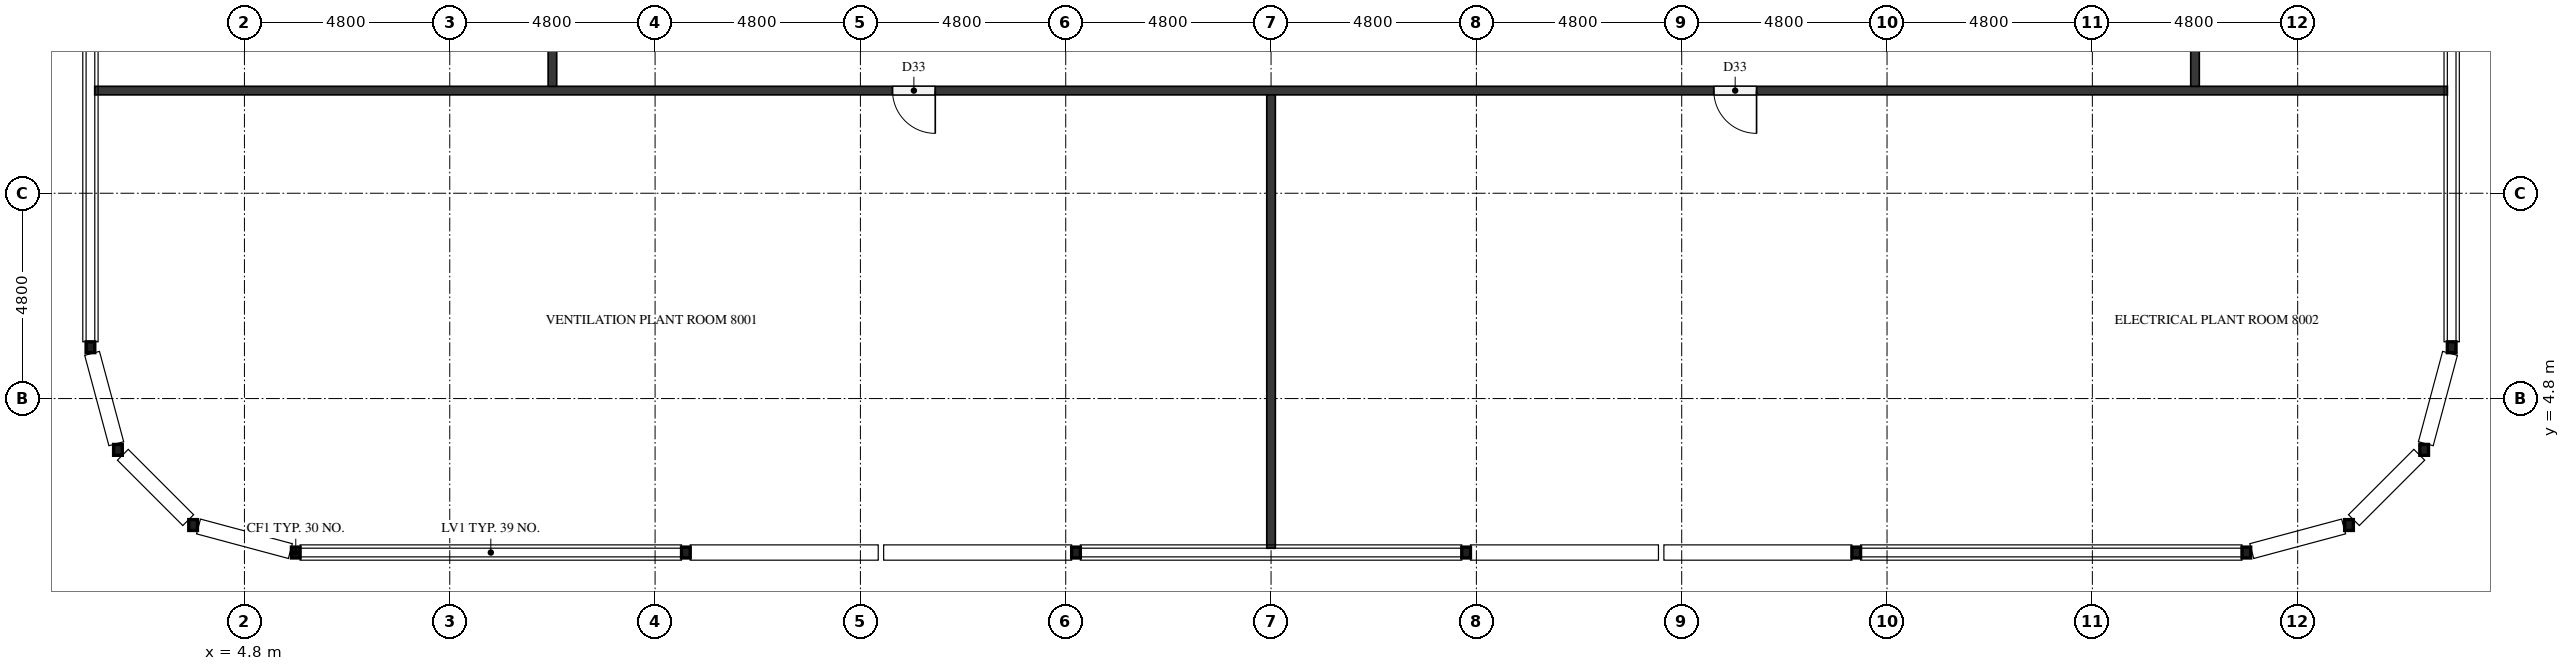
"""IFC4 building model, lengths in metres.
Left out: names, types, materials, properties, quantities, classifications, styles, units other than length and angle.
Written with IfcOpenShell. Run it as: python <this file> out.ifc"""

import sys

from ifc_helpers import new_model, si_unit, direction, frame, frame_2d, origin, origin_2d, place, context, subcontext, project, spatial, rectangle, hollow_rectangle, extrude, element, fill, save


model = new_model("IFC4")
c1 = context("Model", 3, precision=1e-05, world=origin(), true_north=direction((0.0, 1.0)))
c2 = subcontext(c1, "Body", "Model", "MODEL_VIEW")
j1 = project(units=[si_unit("LENGTHUNIT", "METRE"), si_unit("PLANEANGLEUNIT", "RADIAN")], contexts=[c1])
p1 = place(None, origin())
s1 = spatial("IfcSite", under=j1, at=p1, CompositionType="ELEMENT")
p2 = place(p1, origin())
s2 = spatial("IfcBuilding", under=s1, at=p2, CompositionType="ELEMENT")
p3 = place(p2, frame((0.0, 0.0, 310.1)))
s3 = spatial("IfcBuildingStorey", under=s2, at=p3, CompositionType="ELEMENT", Elevation=310.1)
for number, where, z_axis, x_axis in (
    (1, (6.0, 1.2, 0.0), (0.0, 0.0, 1.0), (1.0, 0.0, 0.0)),
    (2, (15.12, 1.2, 0.0), (0.0, 0.0, 1.0), (1.0, 0.0, 0.0)),
    (3, (24.24, 1.2, 0.0), (0.0, 0.0, 1.0), (1.0, 0.0, 0.0)),
    (4, (33.36, 1.2, 0.0), (0.0, 0.0, 1.0), (1.0, 0.0, 0.0)),
    (5, (42.48, 1.2, 0.0), (0.0, 0.0, 1.0), (1.0, 0.0, 0.0)),
    (6, (51.6, 1.2, 0.0), (0.0, 0.0, 1.0), (1.0, 0.0, 0.0)),
    (7, (54.0, 1.843, 0.0), (0.0, 0.0, 1.0), (1.0, 0.0, 0.0)),
    (8, (55.757, 3.6, 0.0), (0.0, 0.0, 1.0), (1.0, 0.0, 0.0)),
    (9, (56.4, 6.0, 0.0), (0.0, 0.0, 1.0), (1.0, 0.0, 0.0)),
    (10, (1.2, 6.0, 0.0), (0.0, 0.0, 1.0), (1.0, 0.0, 0.0)),
    (11, (1.843, 3.6, 0.0), (0.0, 0.0, 1.0), (1.0, 0.0, 0.0)),
    (12, (3.6, 1.843, 0.0), (0.0, 0.0, 1.0), (1.0, 0.0, 0.0)),
):
    element("IfcColumn", number, at=place(p3, frame(where, z_axis=z_axis, x_axis=x_axis)), inside=s3, PredefinedType="COLUMN", context=c2, shape_type="SweptSolid", body=[
        extrude(hollow_rectangle(XDim=0.203, YDim=0.254, WallThickness=0.01, InnerFilletRadius=0.004, OuterFilletRadius=0.013, at=origin_2d()), origin(), (0.0, 0.0, 1.0), 3.8),
    ])
p4 = place(p3, frame((56.3, 12.0, 0.0), z_axis=(0.0, 0.0, 1.0), x_axis=(-1.0, 0.0, 0.0)))
e13 = element("IfcWall", 13, at=p4, inside=s3, PredefinedType="PARTITIONING", context=c2, shape_type="SweptSolid", body=[
    extrude(rectangle(XDim=55.0, YDim=0.2, at=frame_2d((27.5, 0.0))), origin(), (0.0, 0.0, 1.0), 3.8),
])
p5 = place(p4, frame((35.35, 0.0, 0.0)))
e14 = element("IfcOpeningElement", 14, at=p5, cuts=e13, PredefinedType="OPENING", context=c2, shape_type="SweptSolid", body=[
    extrude(rectangle(XDim=1.0, YDim=2.1, at=frame_2d((0.5, 1.05))), frame((0.0, 0.11, 0.0), z_axis=(0.0, -1.0, 0.0), x_axis=(1.0, 0.0, 0.0)), (0.0, 0.0, 1.0), 0.22),
])
p6 = place(p4, frame((16.15, 0.0, 0.0)))
e15 = element("IfcOpeningElement", 15, at=p6, cuts=e13, PredefinedType="OPENING", context=c2, shape_type="SweptSolid", body=[
    extrude(rectangle(XDim=1.0, YDim=2.1, at=frame_2d((0.5, 1.05))), frame((0.0, 0.11, 0.0), z_axis=(0.0, -1.0, 0.0), x_axis=(1.0, 0.0, 0.0)), (0.0, 0.0, 1.0), 0.22),
])
p7 = place(p3, frame((12.0, 12.1, 0.0), z_axis=(0.0, 0.0, 1.0), x_axis=(0.0, 1.0, 0.0)))
e16 = element("IfcWall", 16, at=p7, inside=s3, PredefinedType="PARTITIONING", context=c2, shape_type="SweptSolid", body=[
    extrude(rectangle(XDim=28.6, YDim=0.2, at=frame_2d((14.3, 0.0))), origin(), (0.0, 0.0, 1.0), 3.8),
])
p8 = place(p7, frame((13.75, 0.0, 0.0)))
e17 = element("IfcOpeningElement", 17, at=p8, cuts=e16, PredefinedType="OPENING", context=c2, shape_type="SweptSolid", body=[
    extrude(rectangle(XDim=1.0, YDim=2.1, at=frame_2d((0.5, 1.05))), frame((0.0, 0.11, 0.0), z_axis=(0.0, -1.0, 0.0), x_axis=(1.0, 0.0, 0.0)), (0.0, 0.0, 1.0), 0.22),
])
p9 = place(p3, frame((28.8, 1.3, 0.0), z_axis=(0.0, 0.0, 1.0), x_axis=(0.0, 1.0, 0.0)))
e18 = element("IfcWall", 18, at=p9, inside=s3, PredefinedType="PARTITIONING", context=c2, shape_type="SweptSolid", body=[
    extrude(rectangle(XDim=10.6, YDim=0.2, at=frame_2d((5.3, 0.0))), origin(), (0.0, 0.0, 1.0), 3.8),
])
p10 = place(p3, frame((50.4, 40.7, 0.0), z_axis=(0.0, 0.0, 1.0), x_axis=(0.0, -1.0, 0.0)))
e19 = element("IfcWall", 19, at=p10, inside=s3, PredefinedType="PARTITIONING", context=c2, shape_type="SweptSolid", body=[
    extrude(rectangle(XDim=28.6, YDim=0.2, at=frame_2d((14.3, 0.0))), origin(), (0.0, 0.0, 1.0), 3.8),
])
p11 = place(p10, frame((13.75, 0.0, 0.0)))
e20 = element("IfcOpeningElement", 20, at=p11, cuts=e19, PredefinedType="OPENING", context=c2, shape_type="SweptSolid", body=[
    extrude(rectangle(XDim=1.0, YDim=2.1, at=frame_2d((0.5, 1.05))), frame((0.0, 0.11, 0.0), z_axis=(0.0, -1.0, 0.0), x_axis=(1.0, 0.0, 0.0)), (0.0, 0.0, 1.0), 0.22),
])
p12 = place(p5, origin())
e21 = element("IfcDoor", 21, at=p12, inside=s3, OperationType="SINGLE_SWING_LEFT", PredefinedType="DOOR", context=c2, shape_type="SweptSolid", body=[
    extrude(rectangle(XDim=1.0, YDim=2.1, at=frame_2d((0.5, 1.05))), frame((0.0, 0.025, 0.0), z_axis=(0.0, -1.0, 0.0), x_axis=(1.0, 0.0, 0.0)), (0.0, 0.0, 1.0), 0.05),
])
fill(e14, e21)
p13 = place(p6, origin())
e22 = element("IfcDoor", 22, at=p13, inside=s3, OperationType="SINGLE_SWING_LEFT", PredefinedType="DOOR", context=c2, shape_type="SweptSolid", body=[
    extrude(rectangle(XDim=1.0, YDim=2.1, at=frame_2d((0.5, 1.05))), frame((0.0, 0.025, 0.0), z_axis=(0.0, -1.0, 0.0), x_axis=(1.0, 0.0, 0.0)), (0.0, 0.0, 1.0), 0.05),
])
fill(e15, e22)
save(model, sys.argv[1])
